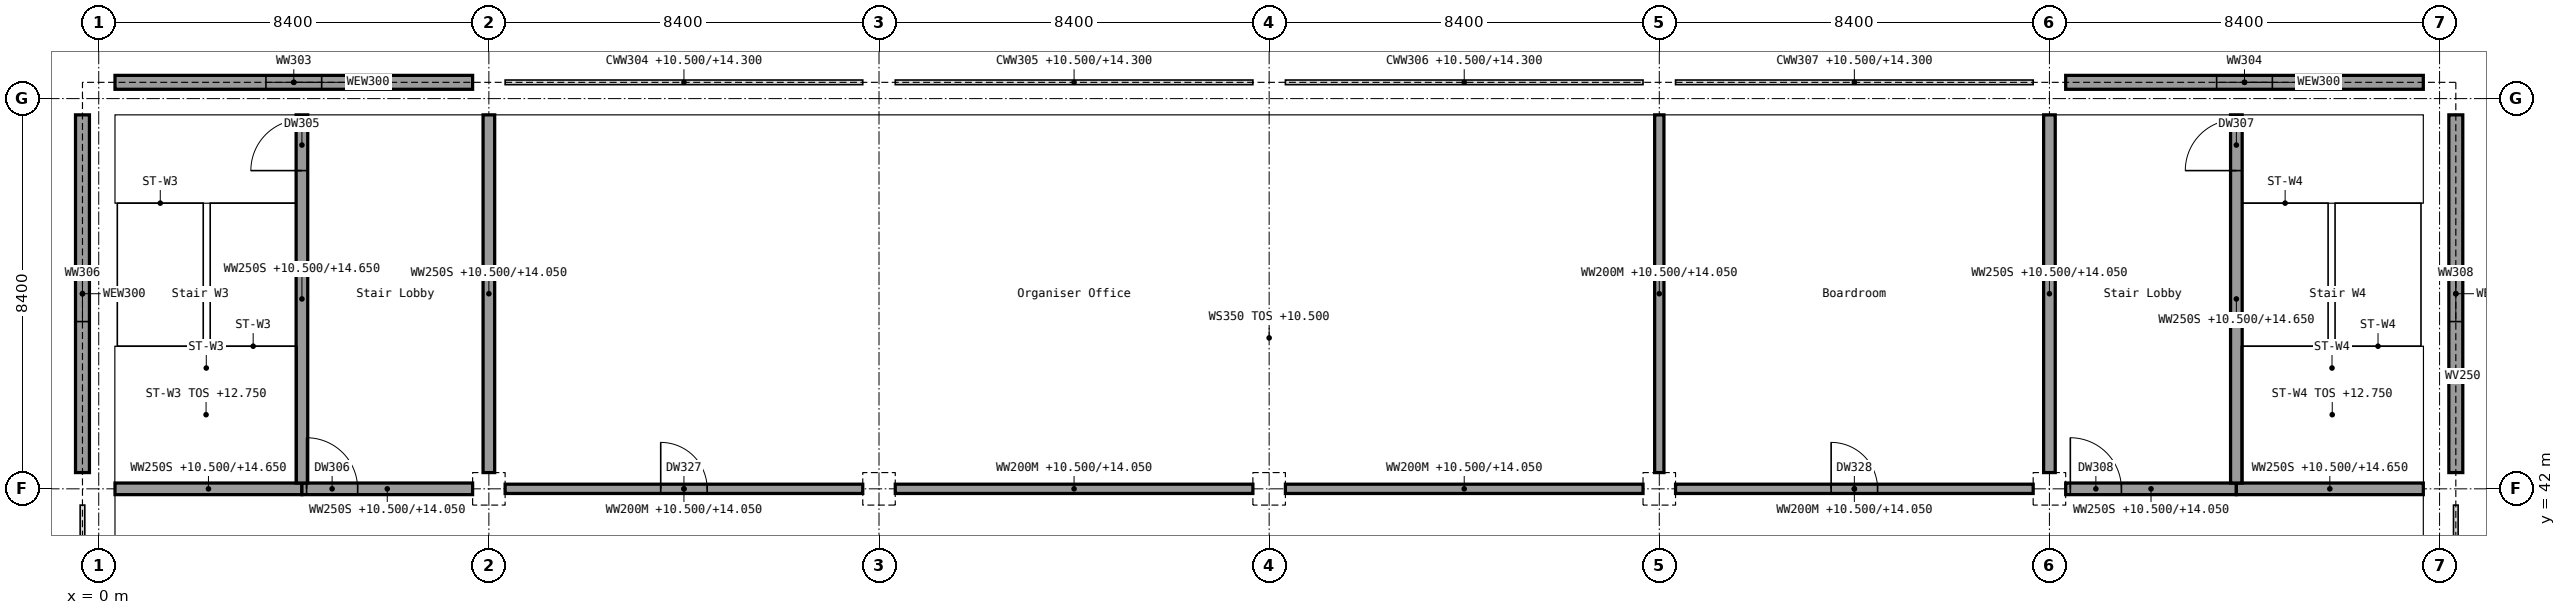
"""IFC4 building model, lengths in metres.
Left out: names, types, materials, properties, quantities, classifications, styles, units other than length and angle.
Written with IfcOpenShell. Run it as: python <this file> out.ifc"""

import sys

from ifc_helpers import new_model, si_unit, direction, frame, frame_2d, origin, origin_2d, place, context, subcontext, project, spatial, rectangle, extrude, element, fill, save


model = new_model("IFC4")
c1 = context("Model", 3, precision=1e-05, world=origin(), true_north=direction((0.0, 1.0)))
c2 = subcontext(c1, "Body", "Model", "MODEL_VIEW")
j1 = project(units=[si_unit("LENGTHUNIT", "METRE"), si_unit("PLANEANGLEUNIT", "RADIAN")], contexts=[c1])
p1 = place(None, origin())
s1 = spatial("IfcSite", under=j1, at=p1, CompositionType="ELEMENT")
p2 = place(p1, origin())
s2 = spatial("IfcBuilding", under=s1, at=p2, CompositionType="ELEMENT")
p3 = place(p2, frame((0.0, 0.0, 10.5)))
s3 = spatial("IfcBuildingStorey", under=s2, at=p3, CompositionType="ELEMENT", Elevation=10.5)
for number, where, z_axis, x_axis in (
    (1, (0.0, 42.0, 0.0), (0.0, 0.0, 1.0), (1.0, 0.0, 0.0)),
    (2, (0.0, 50.4, 0.0), (0.0, 0.0, 1.0), (1.0, 0.0, 0.0)),
    (3, (8.4, 42.0, 0.0), (0.0, 0.0, 1.0), (1.0, 0.0, 0.0)),
    (4, (8.4, 50.4, 0.0), (0.0, 0.0, 1.0), (1.0, 0.0, 0.0)),
    (5, (16.8, 42.0, 0.0), (0.0, 0.0, 1.0), (1.0, 0.0, 0.0)),
    (6, (16.8, 50.4, 0.0), (0.0, 0.0, 1.0), (1.0, 0.0, 0.0)),
    (7, (25.2, 42.0, 0.0), (0.0, 0.0, 1.0), (1.0, 0.0, 0.0)),
    (8, (25.2, 50.4, 0.0), (0.0, 0.0, 1.0), (1.0, 0.0, 0.0)),
    (9, (33.6, 42.0, 0.0), (0.0, 0.0, 1.0), (1.0, 0.0, 0.0)),
    (10, (33.6, 50.4, 0.0), (0.0, 0.0, 1.0), (1.0, 0.0, 0.0)),
    (11, (42.0, 42.0, 0.0), (0.0, 0.0, 1.0), (1.0, 0.0, 0.0)),
    (12, (42.0, 50.4, 0.0), (0.0, 0.0, 1.0), (1.0, 0.0, 0.0)),
    (13, (50.4, 42.0, 0.0), (0.0, 0.0, 1.0), (1.0, 0.0, 0.0)),
    (14, (50.4, 50.4, 0.0), (0.0, 0.0, 1.0), (1.0, 0.0, 0.0)),
):
    element("IfcColumn", number, at=place(p3, frame(where, z_axis=z_axis, x_axis=x_axis)), inside=s3, PredefinedType="COLUMN", context=c2, shape_type="SweptSolid", body=[
        extrude(rectangle(XDim=0.7, YDim=0.7, at=origin_2d()), origin(), (0.0, 0.0, 1.0), 4.5),
    ])
p4 = place(p3, frame((0.35, 50.75, 0.0), z_axis=(0.0, 0.0, 1.0), x_axis=(1.0, 0.0, 0.0)))
e15 = element("IfcWall", 15, at=p4, inside=s3, PredefinedType="SOLIDWALL", context=c2, shape_type="SweptSolid", body=[
    extrude(rectangle(XDim=7.7, YDim=0.3, at=frame_2d((3.85, 0.0))), origin(), (0.0, 0.0, 1.0), 3.8),
])
p5 = place(p4, frame((3.25, 0.0, 1.0)))
e16 = element("IfcOpeningElement", 16, at=p5, cuts=e15, PredefinedType="OPENING", context=c2, shape_type="SweptSolid", body=[
    extrude(rectangle(XDim=1.2, YDim=1.5, at=frame_2d((0.6, 0.75))), frame((0.0, 0.15, 0.0), z_axis=(0.0, -1.0, 0.0), x_axis=(1.0, 0.0, 0.0)), (0.0, 0.0, 1.0), 0.3),
])
p6 = place(p3, frame((42.35, 50.75, 0.0), z_axis=(0.0, 0.0, 1.0), x_axis=(1.0, 0.0, 0.0)))
e17 = element("IfcWall", 17, at=p6, inside=s3, PredefinedType="SOLIDWALL", context=c2, shape_type="SweptSolid", body=[
    extrude(rectangle(XDim=7.7, YDim=0.3, at=frame_2d((3.85, 0.0))), origin(), (0.0, 0.0, 1.0), 3.8),
])
p7 = place(p6, frame((3.25, 0.0, 1.0)))
e18 = element("IfcOpeningElement", 18, at=p7, cuts=e17, PredefinedType="OPENING", context=c2, shape_type="SweptSolid", body=[
    extrude(rectangle(XDim=1.2, YDim=1.5, at=frame_2d((0.6, 0.75))), frame((0.0, 0.15, 0.0), z_axis=(0.0, -1.0, 0.0), x_axis=(1.0, 0.0, 0.0)), (0.0, 0.0, 1.0), 0.3),
])
p8 = place(p3, frame((-0.35, 42.35, 0.0), z_axis=(0.0, 0.0, 1.0), x_axis=(0.0, 1.0, 0.0)))
e19 = element("IfcWall", 19, at=p8, inside=s3, PredefinedType="SOLIDWALL", context=c2, shape_type="SweptSolid", body=[
    extrude(rectangle(XDim=7.7, YDim=0.3, at=frame_2d((3.85, 0.0))), origin(), (0.0, 0.0, 1.0), 3.8),
])
p9 = place(p8, frame((3.25, 0.0, 1.0)))
e20 = element("IfcOpeningElement", 20, at=p9, cuts=e19, PredefinedType="OPENING", context=c2, shape_type="SweptSolid", body=[
    extrude(rectangle(XDim=1.2, YDim=1.5, at=frame_2d((0.6, 0.75))), frame((0.0, 0.15, 0.0), z_axis=(0.0, -1.0, 0.0), x_axis=(1.0, 0.0, 0.0)), (0.0, 0.0, 1.0), 0.3),
])
p10 = place(p3, frame((50.75, 42.35, 0.0), z_axis=(0.0, 0.0, 1.0), x_axis=(0.0, 1.0, 0.0)))
e21 = element("IfcWall", 21, at=p10, inside=s3, PredefinedType="SOLIDWALL", context=c2, shape_type="SweptSolid", body=[
    extrude(rectangle(XDim=7.7, YDim=0.3, at=frame_2d((3.85, 0.0))), origin(), (0.0, 0.0, 1.0), 3.8),
])
p11 = place(p10, frame((3.25, 0.0, 1.0)))
e22 = element("IfcOpeningElement", 22, at=p11, cuts=e21, PredefinedType="OPENING", context=c2, shape_type="SweptSolid", body=[
    extrude(rectangle(XDim=1.2, YDim=1.5, at=frame_2d((0.6, 0.75))), frame((0.0, 0.15, 0.0), z_axis=(0.0, -1.0, 0.0), x_axis=(1.0, 0.0, 0.0)), (0.0, 0.0, 1.0), 0.3),
])
p12 = place(p3, frame((0.35, 42.0, 0.0), z_axis=(0.0, 0.0, 1.0), x_axis=(1.0, 0.0, 0.0)))
e23 = element("IfcWall", 23, at=p12, inside=s3, PredefinedType="SHEAR", context=c2, shape_type="SweptSolid", body=[
    extrude(rectangle(XDim=4.025, YDim=0.25, at=frame_2d((2.012, 0.0))), origin(), (0.0, 0.0, 1.0), 4.15),
])
p13 = place(p3, frame((4.375, 42.0, 0.0), z_axis=(0.0, 0.0, 1.0), x_axis=(1.0, 0.0, 0.0)))
e24 = element("IfcWall", 24, at=p13, inside=s3, PredefinedType="SHEAR", context=c2, shape_type="SweptSolid", body=[
    extrude(rectangle(XDim=3.675, YDim=0.25, at=frame_2d((1.837, 0.0))), origin(), (0.0, 0.0, 1.0), 3.55),
])
p14 = place(p13, frame((0.1, 0.0, 0.0)))
e25 = element("IfcOpeningElement", 25, at=p14, cuts=e24, PredefinedType="OPENING", context=c2, shape_type="SweptSolid", body=[
    extrude(rectangle(XDim=1.1, YDim=2.1, at=frame_2d((0.55, 1.05))), frame((0.0, 0.125, 0.0), z_axis=(0.0, -1.0, 0.0), x_axis=(1.0, 0.0, 0.0)), (0.0, 0.0, 1.0), 0.25),
])
p15 = place(p3, frame((8.75, 42.0, 0.0), z_axis=(0.0, 0.0, 1.0), x_axis=(1.0, 0.0, 0.0)))
e26 = element("IfcWall", 26, at=p15, inside=s3, PredefinedType="PARTITIONING", context=c2, shape_type="SweptSolid", body=[
    extrude(rectangle(XDim=7.7, YDim=0.2, at=frame_2d((3.85, 0.0))), origin(), (0.0, 0.0, 1.0), 3.55),
])
p16 = place(p15, frame((3.35, 0.0, 0.0)))
e27 = element("IfcOpeningElement", 27, at=p16, cuts=e26, PredefinedType="OPENING", context=c2, shape_type="SweptSolid", body=[
    extrude(rectangle(XDim=1.0, YDim=2.1, at=frame_2d((0.5, 1.05))), frame((0.0, 0.1, 0.0), z_axis=(0.0, -1.0, 0.0), x_axis=(1.0, 0.0, 0.0)), (0.0, 0.0, 1.0), 0.2),
])
p17 = place(p3, frame((17.15, 42.0, 0.0), z_axis=(0.0, 0.0, 1.0), x_axis=(1.0, 0.0, 0.0)))
e28 = element("IfcWall", 28, at=p17, inside=s3, PredefinedType="PARTITIONING", context=c2, shape_type="SweptSolid", body=[
    extrude(rectangle(XDim=7.7, YDim=0.2, at=frame_2d((3.85, 0.0))), origin(), (0.0, 0.0, 1.0), 3.55),
])
p18 = place(p3, frame((25.55, 42.0, 0.0), z_axis=(0.0, 0.0, 1.0), x_axis=(1.0, 0.0, 0.0)))
e29 = element("IfcWall", 29, at=p18, inside=s3, PredefinedType="PARTITIONING", context=c2, shape_type="SweptSolid", body=[
    extrude(rectangle(XDim=7.7, YDim=0.2, at=frame_2d((3.85, 0.0))), origin(), (0.0, 0.0, 1.0), 3.55),
])
p19 = place(p3, frame((33.95, 42.0, 0.0), z_axis=(0.0, 0.0, 1.0), x_axis=(1.0, 0.0, 0.0)))
e30 = element("IfcWall", 30, at=p19, inside=s3, PredefinedType="PARTITIONING", context=c2, shape_type="SweptSolid", body=[
    extrude(rectangle(XDim=7.7, YDim=0.2, at=frame_2d((3.85, 0.0))), origin(), (0.0, 0.0, 1.0), 3.55),
])
p20 = place(p19, frame((3.35, 0.0, 0.0)))
e31 = element("IfcOpeningElement", 31, at=p20, cuts=e30, PredefinedType="OPENING", context=c2, shape_type="SweptSolid", body=[
    extrude(rectangle(XDim=1.0, YDim=2.1, at=frame_2d((0.5, 1.05))), frame((0.0, 0.1, 0.0), z_axis=(0.0, -1.0, 0.0), x_axis=(1.0, 0.0, 0.0)), (0.0, 0.0, 1.0), 0.2),
])
p21 = place(p3, frame((42.35, 42.0, 0.0), z_axis=(0.0, 0.0, 1.0), x_axis=(1.0, 0.0, 0.0)))
e32 = element("IfcWall", 32, at=p21, inside=s3, PredefinedType="SHEAR", context=c2, shape_type="SweptSolid", body=[
    extrude(rectangle(XDim=3.675, YDim=0.25, at=frame_2d((1.837, 0.0))), origin(), (0.0, 0.0, 1.0), 3.55),
])
p22 = place(p21, frame((0.1, 0.0, 0.0)))
e33 = element("IfcOpeningElement", 33, at=p22, cuts=e32, PredefinedType="OPENING", context=c2, shape_type="SweptSolid", body=[
    extrude(rectangle(XDim=1.1, YDim=2.1, at=frame_2d((0.55, 1.05))), frame((0.0, 0.125, 0.0), z_axis=(0.0, -1.0, 0.0), x_axis=(1.0, 0.0, 0.0)), (0.0, 0.0, 1.0), 0.25),
])
p23 = place(p3, frame((46.025, 42.0, 0.0), z_axis=(0.0, 0.0, 1.0), x_axis=(1.0, 0.0, 0.0)))
e34 = element("IfcWall", 34, at=p23, inside=s3, PredefinedType="SHEAR", context=c2, shape_type="SweptSolid", body=[
    extrude(rectangle(XDim=4.025, YDim=0.25, at=frame_2d((2.013, 0.0))), origin(), (0.0, 0.0, 1.0), 4.15),
])
p24 = place(p3, frame((4.375, 42.125, 0.0), z_axis=(0.0, 0.0, 1.0), x_axis=(0.0, 1.0, 0.0)))
e35 = element("IfcWall", 35, at=p24, inside=s3, PredefinedType="SHEAR", context=c2, shape_type="SweptSolid", body=[
    extrude(rectangle(XDim=7.925, YDim=0.25, at=frame_2d((3.962, 0.0))), origin(), (0.0, 0.0, 1.0), 4.15),
])
p25 = place(p24, frame((6.725, 0.0, 0.0)))
e36 = element("IfcOpeningElement", 36, at=p25, cuts=e35, PredefinedType="OPENING", context=c2, shape_type="SweptSolid", body=[
    extrude(rectangle(XDim=1.1, YDim=2.1, at=frame_2d((0.55, 1.05))), frame((0.0, 0.125, 0.0), z_axis=(0.0, -1.0, 0.0), x_axis=(1.0, 0.0, 0.0)), (0.0, 0.0, 1.0), 0.25),
])
p26 = place(p3, frame((8.4, 42.35, 0.0), z_axis=(0.0, 0.0, 1.0), x_axis=(0.0, 1.0, 0.0)))
e37 = element("IfcWall", 37, at=p26, inside=s3, PredefinedType="SHEAR", context=c2, shape_type="SweptSolid", body=[
    extrude(rectangle(XDim=7.7, YDim=0.25, at=frame_2d((3.85, 0.0))), origin(), (0.0, 0.0, 1.0), 3.55),
])
p27 = place(p3, frame((33.6, 42.35, 0.0), z_axis=(0.0, 0.0, 1.0), x_axis=(0.0, 1.0, 0.0)))
e38 = element("IfcWall", 38, at=p27, inside=s3, PredefinedType="PARTITIONING", context=c2, shape_type="SweptSolid", body=[
    extrude(rectangle(XDim=7.7, YDim=0.2, at=frame_2d((3.85, 0.0))), origin(), (0.0, 0.0, 1.0), 3.55),
])
p28 = place(p3, frame((42.0, 42.35, 0.0), z_axis=(0.0, 0.0, 1.0), x_axis=(0.0, 1.0, 0.0)))
e39 = element("IfcWall", 39, at=p28, inside=s3, PredefinedType="SHEAR", context=c2, shape_type="SweptSolid", body=[
    extrude(rectangle(XDim=7.7, YDim=0.25, at=frame_2d((3.85, 0.0))), origin(), (0.0, 0.0, 1.0), 3.55),
])
p29 = place(p3, frame((46.025, 42.125, 0.0), z_axis=(0.0, 0.0, 1.0), x_axis=(0.0, 1.0, 0.0)))
e40 = element("IfcWall", 40, at=p29, inside=s3, PredefinedType="SHEAR", context=c2, shape_type="SweptSolid", body=[
    extrude(rectangle(XDim=7.925, YDim=0.25, at=frame_2d((3.962, 0.0))), origin(), (0.0, 0.0, 1.0), 4.15),
])
p30 = place(p29, frame((6.725, 0.0, 0.0)))
e41 = element("IfcOpeningElement", 41, at=p30, cuts=e40, PredefinedType="OPENING", context=c2, shape_type="SweptSolid", body=[
    extrude(rectangle(XDim=1.1, YDim=2.1, at=frame_2d((0.55, 1.05))), frame((0.0, 0.125, 0.0), z_axis=(0.0, -1.0, 0.0), x_axis=(1.0, 0.0, 0.0)), (0.0, 0.0, 1.0), 0.25),
])
p31 = place(p5, origin())
e42 = element("IfcWindow", 42, at=p31, inside=s3, PartitioningType="SINGLE_PANEL", PredefinedType="WINDOW", context=c2, shape_type="SweptSolid", body=[
    extrude(rectangle(XDim=1.2, YDim=1.5, at=frame_2d((0.6, 0.75))), frame((0.0, 0.03, 0.0), z_axis=(0.0, -1.0, 0.0), x_axis=(1.0, 0.0, 0.0)), (0.0, 0.0, 1.0), 0.06),
])
fill(e16, e42)
p32 = place(p7, origin())
e43 = element("IfcWindow", 43, at=p32, inside=s3, PartitioningType="SINGLE_PANEL", PredefinedType="WINDOW", context=c2, shape_type="SweptSolid", body=[
    extrude(rectangle(XDim=1.2, YDim=1.5, at=frame_2d((0.6, 0.75))), frame((0.0, 0.03, 0.0), z_axis=(0.0, -1.0, 0.0), x_axis=(1.0, 0.0, 0.0)), (0.0, 0.0, 1.0), 0.06),
])
fill(e18, e43)
p33 = place(p9, origin())
e44 = element("IfcWindow", 44, at=p33, inside=s3, PartitioningType="SINGLE_PANEL", PredefinedType="WINDOW", context=c2, shape_type="SweptSolid", body=[
    extrude(rectangle(XDim=1.2, YDim=1.5, at=frame_2d((0.6, 0.75))), frame((0.0, 0.03, 0.0), z_axis=(0.0, -1.0, 0.0), x_axis=(1.0, 0.0, 0.0)), (0.0, 0.0, 1.0), 0.06),
])
fill(e20, e44)
p34 = place(p11, origin())
e45 = element("IfcWindow", 45, at=p34, inside=s3, PartitioningType="SINGLE_PANEL", PredefinedType="WINDOW", context=c2, shape_type="SweptSolid", body=[
    extrude(rectangle(XDim=1.2, YDim=1.5, at=frame_2d((0.6, 0.75))), frame((0.0, 0.03, 0.0), z_axis=(0.0, -1.0, 0.0), x_axis=(1.0, 0.0, 0.0)), (0.0, 0.0, 1.0), 0.06),
])
fill(e22, e45)
p35 = place(p25, origin())
e46 = element("IfcDoor", 46, at=p35, inside=s3, OperationType="SINGLE_SWING_RIGHT", PredefinedType="DOOR", context=c2, shape_type="SweptSolid", body=[
    extrude(rectangle(XDim=1.1, YDim=2.1, at=frame_2d((0.55, 1.05))), frame((0.0, 0.025, 0.0), z_axis=(0.0, -1.0, 0.0), x_axis=(1.0, 0.0, 0.0)), (0.0, 0.0, 1.0), 0.05),
])
fill(e36, e46)
p36 = place(p14, origin())
e47 = element("IfcDoor", 47, at=p36, inside=s3, OperationType="SINGLE_SWING_LEFT", PredefinedType="DOOR", context=c2, shape_type="SweptSolid", body=[
    extrude(rectangle(XDim=1.1, YDim=2.1, at=frame_2d((0.55, 1.05))), frame((0.0, 0.025, 0.0), z_axis=(0.0, -1.0, 0.0), x_axis=(1.0, 0.0, 0.0)), (0.0, 0.0, 1.0), 0.05),
])
fill(e25, e47)
p37 = place(p30, origin())
e48 = element("IfcDoor", 48, at=p37, inside=s3, OperationType="SINGLE_SWING_RIGHT", PredefinedType="DOOR", context=c2, shape_type="SweptSolid", body=[
    extrude(rectangle(XDim=1.1, YDim=2.1, at=frame_2d((0.55, 1.05))), frame((0.0, 0.025, 0.0), z_axis=(0.0, -1.0, 0.0), x_axis=(1.0, 0.0, 0.0)), (0.0, 0.0, 1.0), 0.05),
])
fill(e41, e48)
p38 = place(p22, origin())
e49 = element("IfcDoor", 49, at=p38, inside=s3, OperationType="SINGLE_SWING_LEFT", PredefinedType="DOOR", context=c2, shape_type="SweptSolid", body=[
    extrude(rectangle(XDim=1.1, YDim=2.1, at=frame_2d((0.55, 1.05))), frame((0.0, 0.025, 0.0), z_axis=(0.0, -1.0, 0.0), x_axis=(1.0, 0.0, 0.0)), (0.0, 0.0, 1.0), 0.05),
])
fill(e33, e49)
p39 = place(p16, origin())
e50 = element("IfcDoor", 50, at=p39, inside=s3, OperationType="SINGLE_SWING_LEFT", PredefinedType="DOOR", context=c2, shape_type="SweptSolid", body=[
    extrude(rectangle(XDim=1.0, YDim=2.1, at=frame_2d((0.5, 1.05))), frame((0.0, 0.025, 0.0), z_axis=(0.0, -1.0, 0.0), x_axis=(1.0, 0.0, 0.0)), (0.0, 0.0, 1.0), 0.05),
])
fill(e27, e50)
p40 = place(p20, origin())
e51 = element("IfcDoor", 51, at=p40, inside=s3, OperationType="SINGLE_SWING_LEFT", PredefinedType="DOOR", context=c2, shape_type="SweptSolid", body=[
    extrude(rectangle(XDim=1.0, YDim=2.1, at=frame_2d((0.5, 1.05))), frame((0.0, 0.025, 0.0), z_axis=(0.0, -1.0, 0.0), x_axis=(1.0, 0.0, 0.0)), (0.0, 0.0, 1.0), 0.05),
])
fill(e31, e51)
save(model, sys.argv[1])
